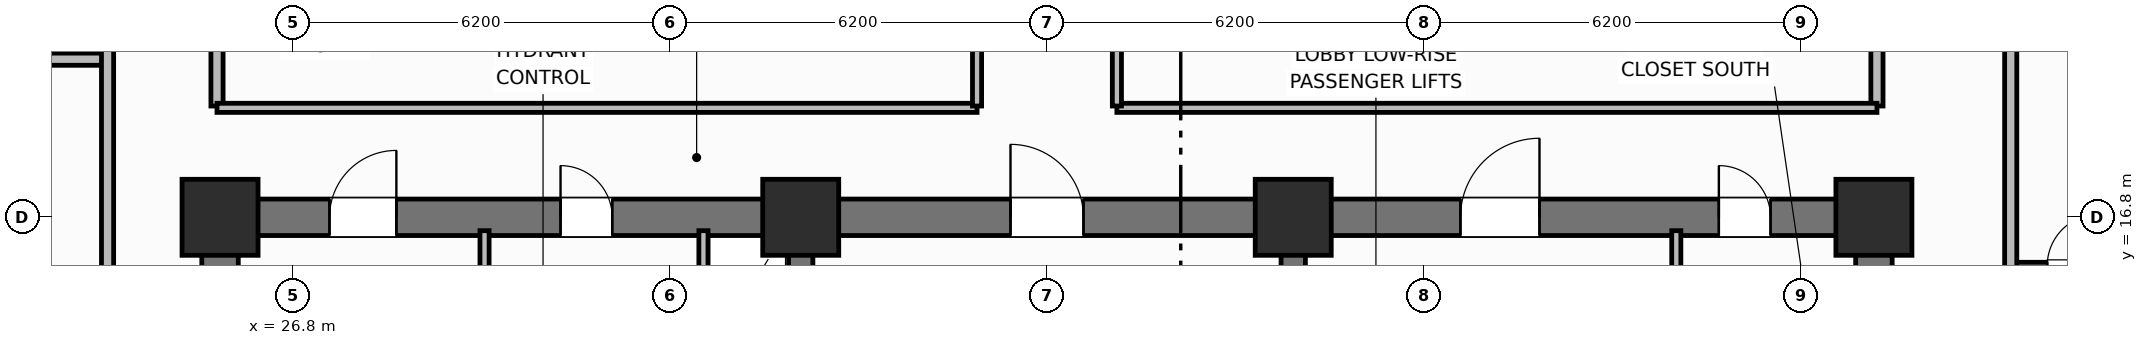
"""IFC4 building model, lengths in metres.
Left out: names, types, materials, properties, quantities, classifications, styles, units other than length and angle.
Written with IfcOpenShell. Run it as: python <this file> out.ifc"""

import sys

from ifc_helpers import new_model, si_unit, direction, frame, frame_2d, origin, origin_2d, place, context, subcontext, project, spatial, rectangle, extrude, element, fill, save


model = new_model("IFC4")
c1 = context("Model", 3, precision=1e-05, world=origin(), true_north=direction((0.0, 1.0)))
c2 = subcontext(c1, "Body", "Model", "MODEL_VIEW")
j1 = project(units=[si_unit("LENGTHUNIT", "METRE"), si_unit("PLANEANGLEUNIT", "RADIAN")], contexts=[c1])
p1 = place(None, origin())
s1 = spatial("IfcSite", under=j1, at=p1, CompositionType="ELEMENT")
p2 = place(p1, origin())
s2 = spatial("IfcBuilding", under=s1, at=p2, CompositionType="ELEMENT")
p3 = place(p2, frame((0.0, 0.0, 51.0)))
s3 = spatial("IfcBuildingStorey", under=s2, at=p3, CompositionType="ELEMENT", Elevation=51.0)
for number, where, z_axis, x_axis in (
    (1, (25.6, 10.9, 0.0), (0.0, 0.0, 1.0), (0.0, 1.0, 0.0)),
    (2, (52.8, 10.9, 0.0), (0.0, 0.0, 1.0), (0.0, 1.0, 0.0)),
):
    element("IfcWall", number, at=place(p3, frame(where, z_axis=z_axis, x_axis=x_axis)), inside=s3, PredefinedType="SHEAR", context=c2, shape_type="SweptSolid", body=[
        extrude(rectangle(XDim=5.6, YDim=0.6, at=frame_2d((2.8, 0.0))), origin(), (0.0, 0.0, 1.0), 3.7),
    ])
p4 = place(p3, frame((25.6, 16.8, 0.0), z_axis=(0.0, 0.0, 1.0), x_axis=(1.0, 0.0, 0.0)))
e3 = element("IfcWall", 3, at=p4, inside=s3, PredefinedType="SHEAR", context=c2, shape_type="SweptSolid", body=[
    extrude(rectangle(XDim=27.2, YDim=0.6, at=frame_2d((13.6, 0.0))), origin(), (0.0, 0.0, 1.0), 3.7),
])
p5 = place(p4, frame((1.8, 0.0, 0.0)))
e4 = element("IfcOpeningElement", 4, at=p5, cuts=e3, PredefinedType="OPENING", context=c2, shape_type="SweptSolid", body=[
    extrude(rectangle(XDim=1.1, YDim=2.15, at=frame_2d((0.55, 1.075))), frame((0.0, 0.31, 0.0), z_axis=(0.0, -1.0, 0.0), x_axis=(1.0, 0.0, 0.0)), (0.0, 0.0, 1.0), 0.62),
])
p6 = place(p4, frame((5.6, 0.0, 0.0)))
e5 = element("IfcOpeningElement", 5, at=p6, cuts=e3, PredefinedType="OPENING", context=c2, shape_type="SweptSolid", body=[
    extrude(rectangle(XDim=0.85, YDim=2.1, at=frame_2d((0.425, 1.05))), frame((0.0, 0.31, 0.0), z_axis=(0.0, -1.0, 0.0), x_axis=(1.0, 0.0, 0.0)), (0.0, 0.0, 1.0), 0.62),
])
p7 = place(p4, frame((13.0, 0.0, 0.0)))
e6 = element("IfcOpeningElement", 6, at=p7, cuts=e3, PredefinedType="OPENING", context=c2, shape_type="SweptSolid", body=[
    extrude(rectangle(XDim=1.2, YDim=2.15, at=frame_2d((0.6, 1.075))), frame((0.0, 0.31, 0.0), z_axis=(0.0, -1.0, 0.0), x_axis=(1.0, 0.0, 0.0)), (0.0, 0.0, 1.0), 0.62),
])
p8 = place(p4, frame((20.4, 0.0, 0.0)))
e7 = element("IfcOpeningElement", 7, at=p8, cuts=e3, PredefinedType="OPENING", context=c2, shape_type="SweptSolid", body=[
    extrude(rectangle(XDim=1.3, YDim=2.2, at=frame_2d((0.65, 1.1))), frame((0.0, 0.31, 0.0), z_axis=(0.0, -1.0, 0.0), x_axis=(1.0, 0.0, 0.0)), (0.0, 0.0, 1.0), 0.62),
])
p9 = place(p4, frame((24.65, 0.0, 0.0)))
e8 = element("IfcOpeningElement", 8, at=p9, cuts=e3, PredefinedType="OPENING", context=c2, shape_type="SweptSolid", body=[
    extrude(rectangle(XDim=0.85, YDim=2.1, at=frame_2d((0.425, 1.05))), frame((0.0, 0.31, 0.0), z_axis=(0.0, -1.0, 0.0), x_axis=(1.0, 0.0, 0.0)), (0.0, 0.0, 1.0), 0.62),
])
for number, where, z_axis, x_axis in (
    (9, (35.15, 10.9, 0.0), (0.0, 0.0, 1.0), (0.0, 1.0, 0.0)),
    (10, (43.25, 10.9, 0.0), (0.0, 0.0, 1.0), (0.0, 1.0, 0.0)),
):
    element("IfcWall", number, at=place(p3, frame(where, z_axis=z_axis, x_axis=x_axis)), inside=s3, PredefinedType="SHEAR", context=c2, shape_type="SweptSolid", body=[
        extrude(rectangle(XDim=5.6, YDim=0.4, at=frame_2d((2.8, 0.0))), origin(), (0.0, 0.0, 1.0), 3.7),
    ])
for number, where, z_axis, x_axis in (
    (11, (25.6, 16.8, 0.0), (0.0, 0.0, 1.0), (1.0, 0.0, 0.0)),
    (12, (35.15, 16.8, 0.0), (0.0, 0.0, 1.0), (1.0, 0.0, 0.0)),
    (13, (43.25, 16.8, 0.0), (0.0, 0.0, 1.0), (1.0, 0.0, 0.0)),
    (14, (52.8, 16.8, 0.0), (0.0, 0.0, 1.0), (1.0, 0.0, 0.0)),
):
    element("IfcColumn", number, at=place(p3, frame(where, z_axis=z_axis, x_axis=x_axis)), inside=s3, PredefinedType="COLUMN", context=c2, shape_type="SweptSolid", body=[
        extrude(rectangle(XDim=1.25, YDim=1.25, at=origin_2d()), origin(), (0.0, 0.0, 1.0), 3.7),
    ])
p10 = place(p3, frame((29.95, 14.5, 0.0), z_axis=(0.0, 0.0, 1.0), x_axis=(0.0, 1.0, 0.0)))
e15 = element("IfcWall", 15, at=p10, inside=s3, PredefinedType="PARTITIONING", context=c2, shape_type="SweptSolid", body=[
    extrude(rectangle(XDim=2.08, YDim=0.15, at=frame_2d((1.04, 0.0))), origin(), (0.0, 0.0, 1.0), 2.53),
])
p11 = place(p3, frame((33.55, 14.5, 0.0), z_axis=(0.0, 0.0, 1.0), x_axis=(0.0, 1.0, 0.0)))
e16 = element("IfcWall", 16, at=p11, inside=s3, PredefinedType="PARTITIONING", context=c2, shape_type="SweptSolid", body=[
    extrude(rectangle(XDim=2.08, YDim=0.15, at=frame_2d((1.04, 0.0))), origin(), (0.0, 0.0, 1.0), 2.53),
])
p12 = place(p11, frame((0.55, 0.0, 0.0)))
e17 = element("IfcOpeningElement", 17, at=p12, cuts=e16, PredefinedType="OPENING", context=c2, shape_type="SweptSolid", body=[
    extrude(rectangle(XDim=0.85, YDim=2.05, at=frame_2d((0.425, 1.025))), frame((0.0, 0.085, 0.0), z_axis=(0.0, -1.0, 0.0), x_axis=(1.0, 0.0, 0.0)), (0.0, 0.0, 1.0), 0.17),
])
p13 = place(p3, frame((49.55, 13.7, 0.0), z_axis=(0.0, 0.0, 1.0), x_axis=(0.0, 1.0, 0.0)))
e18 = element("IfcWall", 18, at=p13, inside=s3, PredefinedType="PARTITIONING", context=c2, shape_type="SweptSolid", body=[
    extrude(rectangle(XDim=2.88, YDim=0.15, at=frame_2d((1.44, 0.0))), origin(), (0.0, 0.0, 1.0), 2.53),
])
for number, where, z_axis, x_axis in (
    (19, (25.55, 18.63, 0.0), (0.0, 0.0, 1.0), (0.0, 1.0, 0.0)),
    (20, (52.85, 18.63, 0.0), (0.0, 0.0, 1.0), (0.0, 1.0, 0.0)),
):
    element("IfcWall", number, at=place(p3, frame(where, z_axis=z_axis, x_axis=x_axis)), inside=s3, PredefinedType="PARTITIONING", context=c2, shape_type="SweptSolid", body=[
        extrude(rectangle(XDim=19.14, YDim=0.2, at=frame_2d((9.57, 0.0))), origin(), (0.0, 0.0, 1.0), 2.53),
    ])
for number, where, z_axis, x_axis in (
    (21, (25.55, 18.6, 0.0), (0.0, 0.0, 1.0), (1.0, 0.0, 0.0)),
    (22, (40.35, 18.6, 0.0), (0.0, 0.0, 1.0), (1.0, 0.0, 0.0)),
):
    element("IfcWall", number, at=place(p3, frame(where, z_axis=z_axis, x_axis=x_axis)), inside=s3, PredefinedType="PARTITIONING", context=c2, shape_type="SweptSolid", body=[
        extrude(rectangle(XDim=12.5, YDim=0.15, at=frame_2d((6.25, 0.0))), origin(), (0.0, 0.0, 1.0), 2.53),
    ])
p14 = place(p3, frame((38.05, 18.63, 0.0), z_axis=(0.0, 0.0, 1.0), x_axis=(0.0, 1.0, 0.0)))
e23 = element("IfcWall", 23, at=p14, inside=s3, PredefinedType="PARTITIONING", context=c2, shape_type="SweptSolid", body=[
    extrude(rectangle(XDim=19.14, YDim=0.15, at=frame_2d((9.57, 0.0))), origin(), (0.0, 0.0, 1.0), 2.53),
])
p15 = place(p14, frame((2.2, 0.0, 0.0)))
e24 = element("IfcOpeningElement", 24, at=p15, cuts=e23, PredefinedType="OPENING", context=c2, shape_type="SweptSolid", body=[
    extrude(rectangle(XDim=1.0, YDim=2.15, at=frame_2d((0.5, 1.075))), frame((0.0, 0.085, 0.0), z_axis=(0.0, -1.0, 0.0), x_axis=(1.0, 0.0, 0.0)), (0.0, 0.0, 1.0), 0.17),
])
p16 = place(p14, frame((10.604, 0.0, 0.0)))
e25 = element("IfcOpeningElement", 25, at=p16, cuts=e23, PredefinedType="OPENING", context=c2, shape_type="SweptSolid", body=[
    extrude(rectangle(XDim=1.0, YDim=2.15, at=frame_2d((0.5, 1.075))), frame((0.0, 0.085, 0.0), z_axis=(0.0, -1.0, 0.0), x_axis=(1.0, 0.0, 0.0)), (0.0, 0.0, 1.0), 0.17),
])
p17 = place(p3, frame((40.35, 18.63, 0.0), z_axis=(0.0, 0.0, 1.0), x_axis=(0.0, 1.0, 0.0)))
e26 = element("IfcWall", 26, at=p17, inside=s3, PredefinedType="PARTITIONING", context=c2, shape_type="SweptSolid", body=[
    extrude(rectangle(XDim=19.14, YDim=0.15, at=frame_2d((9.57, 0.0))), origin(), (0.0, 0.0, 1.0), 2.53),
])
p18 = place(p17, frame((2.2, 0.0, 0.0)))
e27 = element("IfcOpeningElement", 27, at=p18, cuts=e26, PredefinedType="OPENING", context=c2, shape_type="SweptSolid", body=[
    extrude(rectangle(XDim=1.0, YDim=2.15, at=frame_2d((0.5, 1.075))), frame((0.0, 0.085, 0.0), z_axis=(0.0, -1.0, 0.0), x_axis=(1.0, 0.0, 0.0)), (0.0, 0.0, 1.0), 0.17),
])
p19 = place(p17, frame((10.604, 0.0, 0.0)))
e28 = element("IfcOpeningElement", 28, at=p19, cuts=e26, PredefinedType="OPENING", context=c2, shape_type="SweptSolid", body=[
    extrude(rectangle(XDim=0.9, YDim=2.1, at=frame_2d((0.45, 1.05))), frame((0.0, 0.085, 0.0), z_axis=(0.0, -1.0, 0.0), x_axis=(1.0, 0.0, 0.0)), (0.0, 0.0, 1.0), 0.17),
])
p20 = place(p3, frame((14.57, 19.4, 0.0), z_axis=(0.0, 0.0, 1.0), x_axis=(1.0, 0.0, 0.0)))
e29 = element("IfcWall", 29, at=p20, inside=s3, PredefinedType="PARTITIONING", context=c2, shape_type="SweptSolid", body=[
    extrude(rectangle(XDim=9.18, YDim=0.2, at=frame_2d((4.59, 0.0))), origin(), (0.0, 0.0, 1.0), 2.53),
])
p21 = place(p3, frame((23.75, 10.6, 0.0), z_axis=(0.0, 0.0, 1.0), x_axis=(0.0, 1.0, 0.0)))
e30 = element("IfcWall", 30, at=p21, inside=s3, PredefinedType="PARTITIONING", context=c2, shape_type="SweptSolid", body=[
    extrude(rectangle(XDim=35.2, YDim=0.2, at=frame_2d((17.6, 0.0))), origin(), (0.0, 0.0, 1.0), 2.53),
])
p22 = place(p21, frame((2.65, 0.0, 0.0)))
e31 = element("IfcOpeningElement", 31, at=p22, cuts=e30, PredefinedType="OPENING", context=c2, shape_type="SweptSolid", body=[
    extrude(rectangle(XDim=1.0, YDim=2.15, at=frame_2d((0.5, 1.075))), frame((0.0, 0.11, 0.0), z_axis=(0.0, -1.0, 0.0), x_axis=(1.0, 0.0, 0.0)), (0.0, 0.0, 1.0), 0.22),
])
p23 = place(p21, frame((10.81, 0.0, 0.0)))
e32 = element("IfcOpeningElement", 32, at=p23, cuts=e30, PredefinedType="OPENING", context=c2, shape_type="SweptSolid", body=[
    extrude(rectangle(XDim=1.0, YDim=2.15, at=frame_2d((0.5, 1.075))), frame((0.0, 0.11, 0.0), z_axis=(0.0, -1.0, 0.0), x_axis=(1.0, 0.0, 0.0)), (0.0, 0.0, 1.0), 0.22),
])
p24 = place(p21, frame((19.54, 0.0, 0.0)))
e33 = element("IfcOpeningElement", 33, at=p24, cuts=e30, PredefinedType="OPENING", context=c2, shape_type="SweptSolid", body=[
    extrude(rectangle(XDim=1.0, YDim=2.15, at=frame_2d((0.5, 1.075))), frame((0.0, 0.11, 0.0), z_axis=(0.0, -1.0, 0.0), x_axis=(1.0, 0.0, 0.0)), (0.0, 0.0, 1.0), 0.22),
])
p25 = place(p21, frame((26.95, 0.0, 0.0)))
e34 = element("IfcOpeningElement", 34, at=p25, cuts=e30, PredefinedType="OPENING", context=c2, shape_type="SweptSolid", body=[
    extrude(rectangle(XDim=1.0, YDim=2.15, at=frame_2d((0.5, 1.075))), frame((0.0, 0.11, 0.0), z_axis=(0.0, -1.0, 0.0), x_axis=(1.0, 0.0, 0.0)), (0.0, 0.0, 1.0), 0.22),
])
p26 = place(p3, frame((55.05, 16.0, 0.0), z_axis=(0.0, 0.0, 1.0), x_axis=(1.0, 0.0, 0.0)))
e35 = element("IfcWall", 35, at=p26, inside=s3, PredefinedType="PARTITIONING", context=c2, shape_type="SweptSolid", body=[
    extrude(rectangle(XDim=2.25, YDim=0.12, at=frame_2d((1.125, 0.0))), origin(), (0.0, 0.0, 1.0), 2.53),
])
p27 = place(p26, frame((0.6, 0.0, 0.0)))
e36 = element("IfcOpeningElement", 36, at=p27, cuts=e35, PredefinedType="OPENING", context=c2, shape_type="SweptSolid", body=[
    extrude(rectangle(XDim=0.85, YDim=2.1, at=frame_2d((0.425, 1.05))), frame((0.0, 0.07, 0.0), z_axis=(0.0, -1.0, 0.0), x_axis=(1.0, 0.0, 0.0)), (0.0, 0.0, 1.0), 0.14),
])
p28 = place(p3, frame((55.05, 10.6, 0.0), z_axis=(0.0, 0.0, 1.0), x_axis=(0.0, 1.0, 0.0)))
e37 = element("IfcWall", 37, at=p28, inside=s3, PredefinedType="PARTITIONING", context=c2, shape_type="SweptSolid", body=[
    extrude(rectangle(XDim=35.2, YDim=0.2, at=frame_2d((17.6, 0.0))), origin(), (0.0, 0.0, 1.0), 2.53),
])
p29 = place(p28, frame((2.65, 0.0, 0.0)))
e38 = element("IfcOpeningElement", 38, at=p29, cuts=e37, PredefinedType="OPENING", context=c2, shape_type="SweptSolid", body=[
    extrude(rectangle(XDim=1.0, YDim=2.15, at=frame_2d((0.5, 1.075))), frame((0.0, 0.11, 0.0), z_axis=(0.0, -1.0, 0.0), x_axis=(1.0, 0.0, 0.0)), (0.0, 0.0, 1.0), 0.22),
])
p30 = place(p28, frame((22.75, 0.0, 0.0)))
e39 = element("IfcOpeningElement", 39, at=p30, cuts=e37, PredefinedType="OPENING", context=c2, shape_type="SweptSolid", body=[
    extrude(rectangle(XDim=1.0, YDim=2.15, at=frame_2d((0.5, 1.075))), frame((0.0, 0.11, 0.0), z_axis=(0.0, -1.0, 0.0), x_axis=(1.0, 0.0, 0.0)), (0.0, 0.0, 1.0), 0.22),
])
p31 = place(p27, origin())
e40 = element("IfcDoor", 40, at=p31, inside=s3, OperationType="SINGLE_SWING_RIGHT", PredefinedType="DOOR", context=c2, shape_type="SweptSolid", body=[
    extrude(rectangle(XDim=0.85, YDim=2.1, at=frame_2d((0.425, 1.05))), frame((0.0, 0.025, 0.0), z_axis=(0.0, -1.0, 0.0), x_axis=(1.0, 0.0, 0.0)), (0.0, 0.0, 1.0), 0.05),
])
fill(e36, e40)
p32 = place(p5, origin())
e41 = element("IfcDoor", 41, at=p32, inside=s3, OperationType="SINGLE_SWING_RIGHT", PredefinedType="DOOR", context=c2, shape_type="SweptSolid", body=[
    extrude(rectangle(XDim=1.1, YDim=2.15, at=frame_2d((0.55, 1.075))), frame((0.0, 0.025, 0.0), z_axis=(0.0, -1.0, 0.0), x_axis=(1.0, 0.0, 0.0)), (0.0, 0.0, 1.0), 0.05),
])
fill(e4, e41)
p33 = place(p6, origin())
e42 = element("IfcDoor", 42, at=p33, inside=s3, OperationType="SINGLE_SWING_LEFT", PredefinedType="DOOR", context=c2, shape_type="SweptSolid", body=[
    extrude(rectangle(XDim=0.85, YDim=2.1, at=frame_2d((0.425, 1.05))), frame((0.0, 0.025, 0.0), z_axis=(0.0, -1.0, 0.0), x_axis=(1.0, 0.0, 0.0)), (0.0, 0.0, 1.0), 0.05),
])
fill(e5, e42)
p34 = place(p7, origin())
e43 = element("IfcDoor", 43, at=p34, inside=s3, OperationType="SINGLE_SWING_LEFT", PredefinedType="DOOR", context=c2, shape_type="SweptSolid", body=[
    extrude(rectangle(XDim=1.2, YDim=2.15, at=frame_2d((0.6, 1.075))), frame((0.0, 0.025, 0.0), z_axis=(0.0, -1.0, 0.0), x_axis=(1.0, 0.0, 0.0)), (0.0, 0.0, 1.0), 0.05),
])
fill(e6, e43)
p35 = place(p8, origin())
e44 = element("IfcDoor", 44, at=p35, inside=s3, OperationType="SINGLE_SWING_RIGHT", PredefinedType="DOOR", context=c2, shape_type="SweptSolid", body=[
    extrude(rectangle(XDim=1.3, YDim=2.2, at=frame_2d((0.65, 1.1))), frame((0.0, 0.025, 0.0), z_axis=(0.0, -1.0, 0.0), x_axis=(1.0, 0.0, 0.0)), (0.0, 0.0, 1.0), 0.05),
])
fill(e7, e44)
p36 = place(p9, origin())
e45 = element("IfcDoor", 45, at=p36, inside=s3, OperationType="SINGLE_SWING_LEFT", PredefinedType="DOOR", context=c2, shape_type="SweptSolid", body=[
    extrude(rectangle(XDim=0.85, YDim=2.1, at=frame_2d((0.425, 1.05))), frame((0.0, 0.025, 0.0), z_axis=(0.0, -1.0, 0.0), x_axis=(1.0, 0.0, 0.0)), (0.0, 0.0, 1.0), 0.05),
])
fill(e8, e45)
save(model, sys.argv[1])
